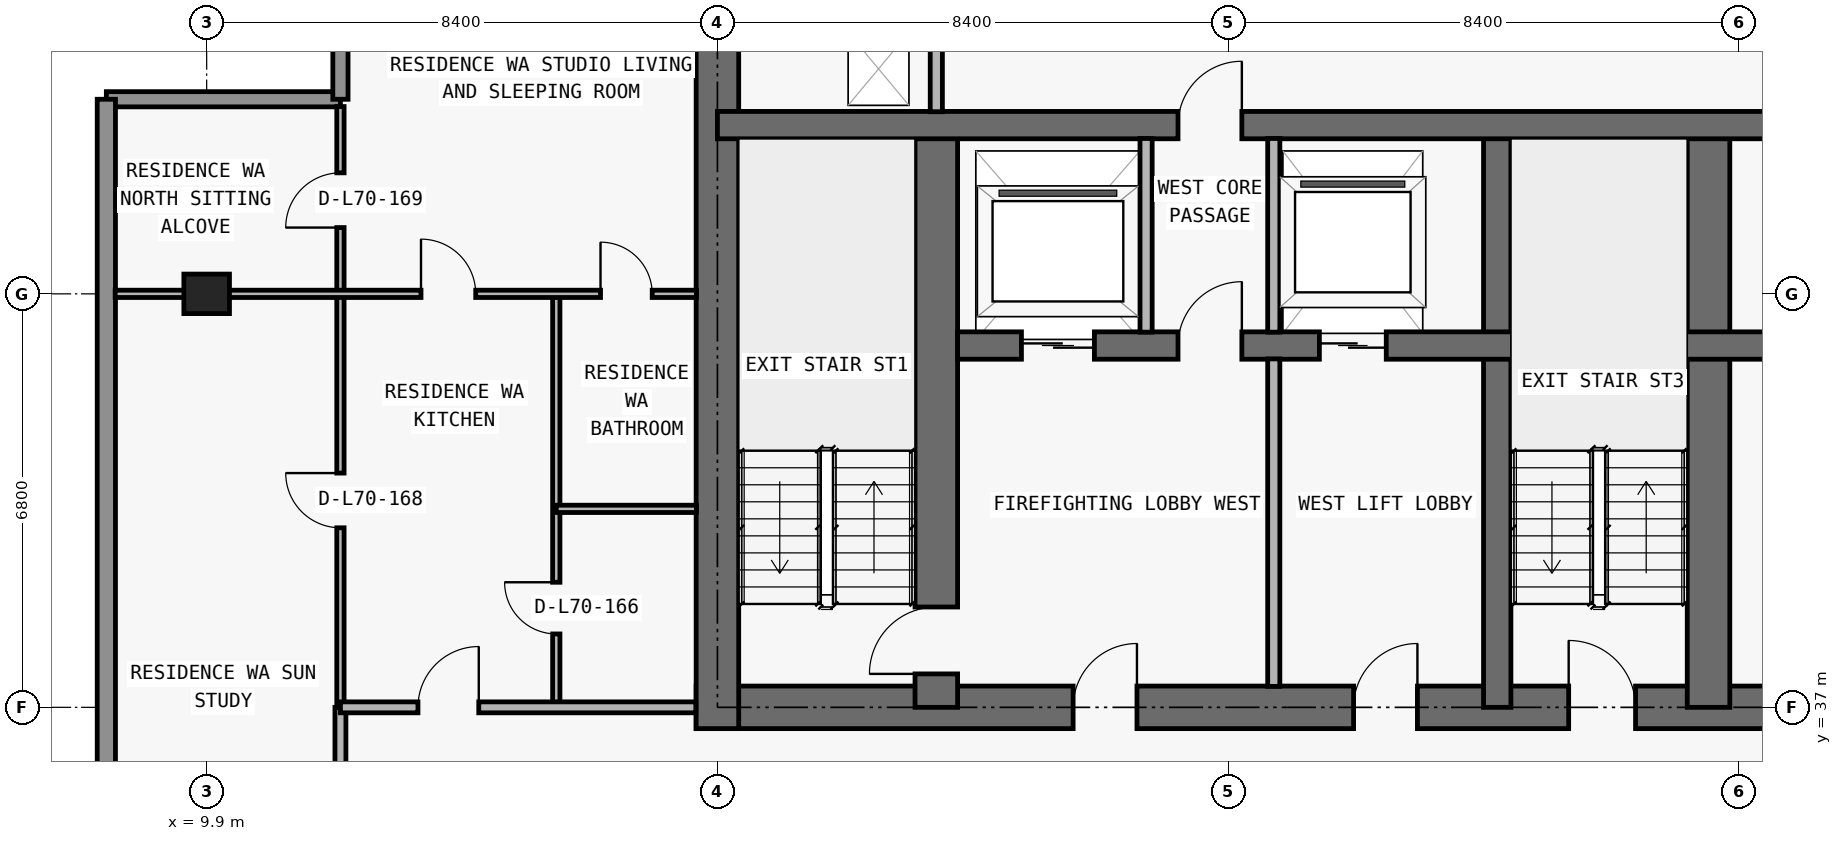
"""IFC4 building model, lengths in metres.
Left out: names, types, materials, properties, quantities, classifications, styles, units other than length and angle.
Written with IfcOpenShell. Run it as: python <this file> out.ifc"""

import sys

from ifc_helpers import new_model, si_unit, direction, frame, frame_2d, origin, origin_2d, place, context, subcontext, project, spatial, rectangle, extrude, element, fill, save


model = new_model("IFC4")
c1 = context("Model", 3, precision=1e-05, world=origin(), true_north=direction((0.0, 1.0)))
c2 = subcontext(c1, "Body", "Model", "MODEL_VIEW")
j1 = project(units=[si_unit("LENGTHUNIT", "METRE"), si_unit("PLANEANGLEUNIT", "RADIAN")], contexts=[c1])
p1 = place(None, origin())
s1 = spatial("IfcSite", under=j1, at=p1, CompositionType="ELEMENT")
p2 = place(p1, origin())
s2 = spatial("IfcBuilding", under=s1, at=p2, CompositionType="ELEMENT")
p3 = place(p2, frame((0.0, 0.0, 249.6)))
s3 = spatial("IfcBuildingStorey", under=s2, at=p3, CompositionType="ELEMENT", Elevation=249.6)
p4 = place(p3, frame((9.9, 43.8, 0.0), z_axis=(0.0, 0.0, 1.0), x_axis=(1.0, 0.0, 0.0)))
e1 = element("IfcColumn", 1, at=p4, inside=s3, PredefinedType="COLUMN", context=c2, shape_type="SweptSolid", body=[
    extrude(rectangle(XDim=0.75, YDim=0.65, at=origin_2d()), origin(), (0.0, 0.0, 1.0), 3.05),
])
p5 = place(p3, frame((17.95, 37.0, 0.0), z_axis=(0.0, 0.0, 1.0), x_axis=(1.0, 0.0, 0.0)))
e2 = element("IfcWall", 2, at=p5, inside=s3, PredefinedType="SHEAR", context=c2, shape_type="SweptSolid", body=[
    extrude(rectangle(XDim=41.9, YDim=0.7, at=frame_2d((20.95, 0.0))), origin(), (0.0, 0.0, 1.0), 3.05),
])
p6 = place(p5, frame((14.35, 0.0, 0.0)))
e3 = element("IfcOpeningElement", 3, at=p6, cuts=e2, PredefinedType="OPENING", context=c2, shape_type="SweptSolid", body=[
    extrude(rectangle(XDim=1.1, YDim=2.15, at=frame_2d((0.55, 1.075))), frame((0.0, 0.36, 0.0), z_axis=(0.0, -1.0, 0.0), x_axis=(1.0, 0.0, 0.0)), (0.0, 0.0, 1.0), 0.72),
])
p7 = place(p5, frame((6.2, 0.0, 0.0)))
e4 = element("IfcOpeningElement", 4, at=p7, cuts=e2, PredefinedType="OPENING", context=c2, shape_type="SweptSolid", body=[
    extrude(rectangle(XDim=1.05, YDim=2.15, at=frame_2d((0.525, 1.075))), frame((0.0, 0.36, 0.0), z_axis=(0.0, -1.0, 0.0), x_axis=(1.0, 0.0, 0.0)), (0.0, 0.0, 1.0), 0.72),
])
p8 = place(p5, frame((34.7, 0.0, 0.0)))
e5 = element("IfcOpeningElement", 5, at=p8, cuts=e2, PredefinedType="OPENING", context=c2, shape_type="SweptSolid", body=[
    extrude(rectangle(XDim=1.05, YDim=2.15, at=frame_2d((0.525, 1.075))), frame((0.0, 0.36, 0.0), z_axis=(0.0, -1.0, 0.0), x_axis=(1.0, 0.0, 0.0)), (0.0, 0.0, 1.0), 0.72),
])
p9 = place(p5, frame((10.812, 0.0, 0.0)))
e6 = element("IfcOpeningElement", 6, at=p9, cuts=e2, PredefinedType="OPENING", context=c2, shape_type="SweptSolid", body=[
    extrude(rectangle(XDim=1.05, YDim=2.15, at=frame_2d((0.525, 1.075))), frame((0.0, 0.36, 0.0), z_axis=(0.0, -1.0, 0.0), x_axis=(1.0, 0.0, 0.0)), (0.0, 0.0, 1.0), 0.72),
])
p10 = place(p5, frame((24.05, 0.0, 0.0)))
e7 = element("IfcOpeningElement", 7, at=p10, cuts=e2, PredefinedType="OPENING", context=c2, shape_type="SweptSolid", body=[
    extrude(rectangle(XDim=1.05, YDim=2.15, at=frame_2d((0.525, 1.075))), frame((0.0, 0.36, 0.0), z_axis=(0.0, -1.0, 0.0), x_axis=(1.0, 0.0, 0.0)), (0.0, 0.0, 1.0), 0.72),
])
p11 = place(p3, frame((18.3, 36.65, 0.0), z_axis=(0.0, 0.0, 1.0), x_axis=(0.0, 1.0, 0.0)))
e8 = element("IfcWall", 8, at=p11, inside=s3, PredefinedType="SHEAR", context=c2, shape_type="SweptSolid", body=[
    extrude(rectangle(XDim=13.95, YDim=0.7, at=frame_2d((6.975, 0.0))), origin(), (0.0, 0.0, 1.0), 3.05),
])
p12 = place(p3, frame((21.9, 37.0, 0.0), z_axis=(0.0, 0.0, 1.0), x_axis=(0.0, 1.0, 0.0)))
e9 = element("IfcWall", 9, at=p12, inside=s3, PredefinedType="SHEAR", context=c2, shape_type="SweptSolid", body=[
    extrude(rectangle(XDim=9.575, YDim=0.7, at=frame_2d((4.788, 0.0))), origin(), (0.0, 0.0, 1.0), 3.05),
])
p13 = place(p12, frame((0.55, 0.0, 0.0)))
e10 = element("IfcOpeningElement", 10, at=p13, cuts=e9, PredefinedType="OPENING", context=c2, shape_type="SweptSolid", body=[
    extrude(rectangle(XDim=1.1, YDim=2.15, at=frame_2d((0.55, 1.075))), frame((0.0, 0.36, 0.0), z_axis=(0.0, -1.0, 0.0), x_axis=(1.0, 0.0, 0.0)), (0.0, 0.0, 1.0), 0.72),
])
p14 = place(p3, frame((31.125, 37.0, 0.0), z_axis=(0.0, 0.0, 1.0), x_axis=(0.0, 1.0, 0.0)))
e11 = element("IfcWall", 11, at=p14, inside=s3, PredefinedType="SHEAR", context=c2, shape_type="SweptSolid", body=[
    extrude(rectangle(XDim=9.575, YDim=0.45, at=frame_2d((4.788, 0.0))), origin(), (0.0, 0.0, 1.0), 3.05),
])
p15 = place(p3, frame((34.6, 37.0, 0.0), z_axis=(0.0, 0.0, 1.0), x_axis=(0.0, 1.0, 0.0)))
e12 = element("IfcWall", 12, at=p15, inside=s3, PredefinedType="SHEAR", context=c2, shape_type="SweptSolid", body=[
    extrude(rectangle(XDim=9.575, YDim=0.7, at=frame_2d((4.788, 0.0))), origin(), (0.0, 0.0, 1.0), 3.05),
])
p16 = place(p3, frame((22.25, 42.95, 0.0), z_axis=(0.0, 0.0, 1.0), x_axis=(1.0, 0.0, 0.0)))
e13 = element("IfcWall", 13, at=p16, inside=s3, PredefinedType="SHEAR", context=c2, shape_type="SweptSolid", body=[
    extrude(rectangle(XDim=33.3, YDim=0.45, at=frame_2d((16.65, 0.0))), origin(), (0.0, 0.0, 1.0), 3.05),
])
p17 = place(p16, frame((1.05, 0.0, 0.0)))
e14 = element("IfcOpeningElement", 14, at=p17, cuts=e13, PredefinedType="OPENING", context=c2, shape_type="SweptSolid", body=[
    extrude(rectangle(XDim=1.2, YDim=2.2, at=frame_2d((0.6, 1.1))), frame((0.0, 0.235, 0.0), z_axis=(0.0, -1.0, 0.0), x_axis=(1.0, 0.0, 0.0)), (0.0, 0.0, 1.0), 0.47),
])
p18 = place(p16, frame((31.05, 0.0, 0.0)))
e15 = element("IfcOpeningElement", 15, at=p18, cuts=e13, PredefinedType="OPENING", context=c2, shape_type="SweptSolid", body=[
    extrude(rectangle(XDim=1.2, YDim=2.2, at=frame_2d((0.6, 1.1))), frame((0.0, 0.235, 0.0), z_axis=(0.0, -1.0, 0.0), x_axis=(1.0, 0.0, 0.0)), (0.0, 0.0, 1.0), 0.47),
])
p19 = place(p16, frame((26.45, 0.0, 0.0)))
e16 = element("IfcOpeningElement", 16, at=p19, cuts=e13, PredefinedType="OPENING", context=c2, shape_type="SweptSolid", body=[
    extrude(rectangle(XDim=1.1, YDim=2.2, at=frame_2d((0.55, 1.1))), frame((0.0, 0.235, 0.0), z_axis=(0.0, -1.0, 0.0), x_axis=(1.0, 0.0, 0.0)), (0.0, 0.0, 1.0), 0.47),
])
p20 = place(p16, frame((5.95, 0.0, 0.0)))
e17 = element("IfcOpeningElement", 17, at=p20, cuts=e13, PredefinedType="OPENING", context=c2, shape_type="SweptSolid", body=[
    extrude(rectangle(XDim=1.1, YDim=2.2, at=frame_2d((0.55, 1.1))), frame((0.0, 0.235, 0.0), z_axis=(0.0, -1.0, 0.0), x_axis=(1.0, 0.0, 0.0)), (0.0, 0.0, 1.0), 0.47),
])
p21 = place(p16, frame((3.625, 0.0, 0.0)))
e18 = element("IfcOpeningElement", 18, at=p21, cuts=e13, PredefinedType="OPENING", context=c2, shape_type="SweptSolid", body=[
    extrude(rectangle(XDim=1.05, YDim=2.15, at=frame_2d((0.525, 1.075))), frame((0.0, 0.235, 0.0), z_axis=(0.0, -1.0, 0.0), x_axis=(1.0, 0.0, 0.0)), (0.0, 0.0, 1.0), 0.47),
])
p22 = place(p16, frame((28.675, 0.0, 0.0)))
e19 = element("IfcOpeningElement", 19, at=p22, cuts=e13, PredefinedType="OPENING", context=c2, shape_type="SweptSolid", body=[
    extrude(rectangle(XDim=1.05, YDim=2.15, at=frame_2d((0.525, 1.075))), frame((0.0, 0.235, 0.0), z_axis=(0.0, -1.0, 0.0), x_axis=(1.0, 0.0, 0.0)), (0.0, 0.0, 1.0), 0.47),
])
p23 = place(p16, frame((15.225, 0.0, 0.0)))
e20 = element("IfcOpeningElement", 20, at=p23, cuts=e13, PredefinedType="OPENING", context=c2, shape_type="SweptSolid", body=[
    extrude(rectangle(XDim=1.0, YDim=2.2, at=frame_2d((0.5, 1.1))), frame((0.0, 0.235, 0.0), z_axis=(0.0, -1.0, 0.0), x_axis=(1.0, 0.0, 0.0)), (0.0, 0.0, 1.0), 0.47),
])
p24 = place(p16, frame((21.975, 0.0, 0.0)))
e21 = element("IfcOpeningElement", 21, at=p24, cuts=e13, PredefinedType="OPENING", context=c2, shape_type="SweptSolid", body=[
    extrude(rectangle(XDim=1.0, YDim=2.2, at=frame_2d((0.5, 1.1))), frame((0.0, 0.235, 0.0), z_axis=(0.0, -1.0, 0.0), x_axis=(1.0, 0.0, 0.0)), (0.0, 0.0, 1.0), 0.47),
])
p25 = place(p3, frame((18.3, 46.575, 0.0), z_axis=(0.0, 0.0, 1.0), x_axis=(1.0, 0.0, 0.0)))
e22 = element("IfcWall", 22, at=p25, inside=s3, PredefinedType="SHEAR", context=c2, shape_type="SweptSolid", body=[
    extrude(rectangle(XDim=41.2, YDim=0.45, at=frame_2d((20.6, 0.0))), origin(), (0.0, 0.0, 1.0), 3.05),
])
p26 = place(p25, frame((7.575, 0.0, 0.0)))
e23 = element("IfcOpeningElement", 23, at=p26, cuts=e22, PredefinedType="OPENING", context=c2, shape_type="SweptSolid", body=[
    extrude(rectangle(XDim=1.05, YDim=2.15, at=frame_2d((0.525, 1.075))), frame((0.0, 0.235, 0.0), z_axis=(0.0, -1.0, 0.0), x_axis=(1.0, 0.0, 0.0)), (0.0, 0.0, 1.0), 0.47),
])
p27 = place(p25, frame((32.625, 0.0, 0.0)))
e24 = element("IfcOpeningElement", 24, at=p27, cuts=e22, PredefinedType="OPENING", context=c2, shape_type="SweptSolid", body=[
    extrude(rectangle(XDim=1.05, YDim=2.15, at=frame_2d((0.525, 1.075))), frame((0.0, 0.235, 0.0), z_axis=(0.0, -1.0, 0.0), x_axis=(1.0, 0.0, 0.0)), (0.0, 0.0, 1.0), 0.47),
])
p28 = place(p3, frame((8.25, 47.0, 0.0), z_axis=(0.0, 0.0, 1.0), x_axis=(1.0, 0.0, 0.0)))
e25 = element("IfcWall", 25, at=p28, inside=s3, PredefinedType="ELEMENTEDWALL", context=c2, shape_type="SweptSolid", body=[
    extrude(rectangle(XDim=3.85, YDim=0.25, at=frame_2d((1.925, 0.0))), origin(), (0.0, 0.0, 1.0), 3.05),
])
p29 = place(p3, frame((12.1, 47.0, 0.0), z_axis=(0.0, 0.0, 1.0), x_axis=(0.0, 1.0, 0.0)))
e26 = element("IfcWall", 26, at=p29, inside=s3, PredefinedType="ELEMENTEDWALL", context=c2, shape_type="SweptSolid", body=[
    extrude(rectangle(XDim=3.45, YDim=0.25, at=frame_2d((1.725, 0.0))), origin(), (0.0, 0.0, 1.0), 3.05),
])
p30 = place(p3, frame((8.25, 30.15, 0.0), z_axis=(0.0, 0.0, 1.0), x_axis=(0.0, 1.0, 0.0)))
e27 = element("IfcWall", 27, at=p30, inside=s3, PredefinedType="STANDARD", context=c2, shape_type="SweptSolid", body=[
    extrude(rectangle(XDim=16.85, YDim=0.3, at=frame_2d((8.425, 0.0))), origin(), (0.0, 0.0, 1.0), 3.05),
])
p31 = place(p3, frame((12.1, 34.705, 0.0), z_axis=(0.0, 0.0, 1.0), x_axis=(0.0, 1.0, 0.0)))
e28 = element("IfcWall", 28, at=p31, inside=s3, PredefinedType="PARTITIONING", context=c2, shape_type="SweptSolid", body=[
    extrude(rectangle(XDim=2.295, YDim=0.18, at=frame_2d((1.147, 0.0))), origin(), (0.0, 0.0, 1.0), 2.578),
])
p32 = place(p3, frame((12.1, 37.005, 0.0), z_axis=(0.0, 0.0, 1.0), x_axis=(0.0, 1.0, 0.0)))
e29 = element("IfcWall", 29, at=p32, inside=s3, PredefinedType="PARTITIONING", context=c2, shape_type="SweptSolid", body=[
    extrude(rectangle(XDim=9.875, YDim=0.12, at=frame_2d((4.938, 0.0))), origin(), (0.0, 0.0, 1.0), 2.578),
])
p33 = place(p32, frame((2.948, 0.0, 0.0)))
e30 = element("IfcOpeningElement", 30, at=p33, cuts=e29, PredefinedType="OPENING", context=c2, shape_type="SweptSolid", body=[
    extrude(rectangle(XDim=0.9, YDim=2.15, at=frame_2d((0.45, 1.075))), frame((0.0, 0.07, 0.0), z_axis=(0.0, -1.0, 0.0), x_axis=(1.0, 0.0, 0.0)), (0.0, 0.0, 1.0), 0.14),
])
p34 = place(p32, frame((7.885, 0.0, 0.0)))
e31 = element("IfcOpeningElement", 31, at=p34, cuts=e29, PredefinedType="OPENING", context=c2, shape_type="SweptSolid", body=[
    extrude(rectangle(XDim=0.9, YDim=2.15, at=frame_2d((0.45, 1.075))), frame((0.0, 0.07, 0.0), z_axis=(0.0, -1.0, 0.0), x_axis=(1.0, 0.0, 0.0)), (0.0, 0.0, 1.0), 0.14),
])
p35 = place(p3, frame((15.65, 37.0, 0.0), z_axis=(0.0, 0.0, 1.0), x_axis=(0.0, 1.0, 0.0)))
e32 = element("IfcWall", 32, at=p35, inside=s3, PredefinedType="PARTITIONING", context=c2, shape_type="SweptSolid", body=[
    extrude(rectangle(XDim=6.8, YDim=0.12, at=frame_2d((3.4, 0.0))), origin(), (0.0, 0.0, 1.0), 3.05),
])
p36 = place(p35, frame((1.207, 0.0, 0.0)))
e33 = element("IfcOpeningElement", 33, at=p36, cuts=e32, PredefinedType="OPENING", context=c2, shape_type="SweptSolid", body=[
    extrude(rectangle(XDim=0.85, YDim=2.1, at=frame_2d((0.425, 1.05))), frame((0.0, 0.07, 0.0), z_axis=(0.0, -1.0, 0.0), x_axis=(1.0, 0.0, 0.0)), (0.0, 0.0, 1.0), 0.14),
])
p37 = place(p3, frame((21.9, 46.795, 0.0), z_axis=(0.0, 0.0, 1.0), x_axis=(0.0, 1.0, 0.0)))
e34 = element("IfcWall", 34, at=p37, inside=s3, PredefinedType="PARTITIONING", context=c2, shape_type="SweptSolid", body=[
    extrude(rectangle(XDim=3.16, YDim=0.2, at=frame_2d((1.58, 0.0))), origin(), (0.0, 0.0, 1.0), 3.05),
])
p38 = place(p3, frame((25.35, 43.17, 0.0), z_axis=(0.0, 0.0, 1.0), x_axis=(0.0, 1.0, 0.0)))
e35 = element("IfcWall", 35, at=p38, inside=s3, PredefinedType="PARTITIONING", context=c2, shape_type="SweptSolid", body=[
    extrude(rectangle(XDim=3.185, YDim=0.2, at=frame_2d((1.593, 0.0))), origin(), (0.0, 0.0, 1.0), 3.05),
])
p39 = place(p3, frame((27.45, 37.345, 0.0), z_axis=(0.0, 0.0, 1.0), x_axis=(0.0, 1.0, 0.0)))
e36 = element("IfcWall", 36, at=p39, inside=s3, PredefinedType="PARTITIONING", context=c2, shape_type="SweptSolid", body=[
    extrude(rectangle(XDim=5.385, YDim=0.2, at=frame_2d((2.692, 0.0))), origin(), (0.0, 0.0, 1.0), 3.05),
])
p40 = place(p3, frame((27.45, 43.17, 0.0), z_axis=(0.0, 0.0, 1.0), x_axis=(0.0, 1.0, 0.0)))
e37 = element("IfcWall", 37, at=p40, inside=s3, PredefinedType="PARTITIONING", context=c2, shape_type="SweptSolid", body=[
    extrude(rectangle(XDim=3.185, YDim=0.2, at=frame_2d((1.593, 0.0))), origin(), (0.0, 0.0, 1.0), 3.05),
])
p41 = place(p3, frame((12.1, 37.0, 0.0), z_axis=(0.0, 0.0, 1.0), x_axis=(1.0, 0.0, 0.0)))
e38 = element("IfcWall", 38, at=p41, inside=s3, PredefinedType="PARTITIONING", context=c2, shape_type="SweptSolid", body=[
    extrude(rectangle(XDim=5.845, YDim=0.18, at=frame_2d((2.922, 0.0))), origin(), (0.0, 0.0, 1.0), 3.05),
])
p42 = place(p41, frame((1.275, 0.0, 0.0)))
e39 = element("IfcOpeningElement", 39, at=p42, cuts=e38, PredefinedType="OPENING", context=c2, shape_type="SweptSolid", body=[
    extrude(rectangle(XDim=1.0, YDim=2.2, at=frame_2d((0.5, 1.1))), frame((0.0, 0.1, 0.0), z_axis=(0.0, -1.0, 0.0), x_axis=(1.0, 0.0, 0.0)), (0.0, 0.0, 1.0), 0.2),
])
p43 = place(p3, frame((15.65, 40.264, 0.0), z_axis=(0.0, 0.0, 1.0), x_axis=(1.0, 0.0, 0.0)))
e40 = element("IfcWall", 40, at=p43, inside=s3, PredefinedType="PARTITIONING", context=c2, shape_type="SweptSolid", body=[
    extrude(rectangle(XDim=2.305, YDim=0.12, at=frame_2d((1.153, 0.0))), origin(), (0.0, 0.0, 1.0), 3.05),
])
p44 = place(p3, frame((8.395, 43.8, 0.0), z_axis=(0.0, 0.0, 1.0), x_axis=(1.0, 0.0, 0.0)))
e41 = element("IfcWall", 41, at=p44, inside=s3, PredefinedType="PARTITIONING", context=c2, shape_type="SweptSolid", body=[
    extrude(rectangle(XDim=9.56, YDim=0.12, at=frame_2d((4.78, 0.0))), origin(), (0.0, 0.0, 1.0), 2.418),
])
p45 = place(p44, frame((5.03, 0.0, 0.0)))
e42 = element("IfcOpeningElement", 42, at=p45, cuts=e41, PredefinedType="OPENING", context=c2, shape_type="SweptSolid", body=[
    extrude(rectangle(XDim=0.9, YDim=2.15, at=frame_2d((0.45, 1.075))), frame((0.0, 0.07, 0.0), z_axis=(0.0, -1.0, 0.0), x_axis=(1.0, 0.0, 0.0)), (0.0, 0.0, 1.0), 0.14),
])
p46 = place(p44, frame((7.982, 0.0, 0.0)))
e43 = element("IfcOpeningElement", 43, at=p46, cuts=e41, PredefinedType="OPENING", context=c2, shape_type="SweptSolid", body=[
    extrude(rectangle(XDim=0.85, YDim=2.1, at=frame_2d((0.425, 1.05))), frame((0.0, 0.07, 0.0), z_axis=(0.0, -1.0, 0.0), x_axis=(1.0, 0.0, 0.0)), (0.0, 0.0, 1.0), 0.14),
])
p47 = place(p17, origin())
e44 = element("IfcDoor", 44, at=p47, inside=s3, OperationType="DOUBLE_DOOR_SLIDING", PredefinedType="DOOR", context=c2, shape_type="SweptSolid", body=[
    extrude(rectangle(XDim=1.2, YDim=2.2, at=frame_2d((0.6, 1.1))), frame((0.0, 0.025, 0.0), z_axis=(0.0, -1.0, 0.0), x_axis=(1.0, 0.0, 0.0)), (0.0, 0.0, 1.0), 0.05),
])
fill(e14, e44)
p48 = place(p20, origin())
e45 = element("IfcDoor", 45, at=p48, inside=s3, OperationType="DOUBLE_DOOR_SLIDING", PredefinedType="DOOR", context=c2, shape_type="SweptSolid", body=[
    extrude(rectangle(XDim=1.1, YDim=2.2, at=frame_2d((0.55, 1.1))), frame((0.0, 0.025, 0.0), z_axis=(0.0, -1.0, 0.0), x_axis=(1.0, 0.0, 0.0)), (0.0, 0.0, 1.0), 0.05),
])
fill(e17, e45)
p49 = place(p6, origin())
e46 = element("IfcDoor", 46, at=p49, inside=s3, OperationType="SINGLE_SWING_LEFT", PredefinedType="DOOR", context=c2, shape_type="SweptSolid", body=[
    extrude(rectangle(XDim=1.1, YDim=2.15, at=frame_2d((0.55, 1.075))), frame((0.0, 0.025, 0.0), z_axis=(0.0, -1.0, 0.0), x_axis=(1.0, 0.0, 0.0)), (0.0, 0.0, 1.0), 0.05),
])
fill(e3, e46)
p50 = place(p7, origin())
e47 = element("IfcDoor", 47, at=p50, inside=s3, OperationType="SINGLE_SWING_RIGHT", PredefinedType="DOOR", context=c2, shape_type="SweptSolid", body=[
    extrude(rectangle(XDim=1.05, YDim=2.15, at=frame_2d((0.525, 1.075))), frame((0.0, 0.025, 0.0), z_axis=(0.0, -1.0, 0.0), x_axis=(1.0, 0.0, 0.0)), (0.0, 0.0, 1.0), 0.05),
])
fill(e4, e47)
p51 = place(p13, origin())
e48 = element("IfcDoor", 48, at=p51, inside=s3, OperationType="SINGLE_SWING_LEFT", PredefinedType="DOOR", context=c2, shape_type="SweptSolid", body=[
    extrude(rectangle(XDim=1.1, YDim=2.15, at=frame_2d((0.55, 1.075))), frame((0.0, 0.025, 0.0), z_axis=(0.0, -1.0, 0.0), x_axis=(1.0, 0.0, 0.0)), (0.0, 0.0, 1.0), 0.05),
])
fill(e10, e48)
p52 = place(p21, origin())
e49 = element("IfcDoor", 49, at=p52, inside=s3, OperationType="SINGLE_SWING_RIGHT", PredefinedType="DOOR", context=c2, shape_type="SweptSolid", body=[
    extrude(rectangle(XDim=1.05, YDim=2.15, at=frame_2d((0.525, 1.075))), frame((0.0, 0.025, 0.0), z_axis=(0.0, -1.0, 0.0), x_axis=(1.0, 0.0, 0.0)), (0.0, 0.0, 1.0), 0.05),
])
fill(e18, e49)
p53 = place(p9, origin())
e50 = element("IfcDoor", 50, at=p53, inside=s3, OperationType="SINGLE_SWING_RIGHT", PredefinedType="DOOR", context=c2, shape_type="SweptSolid", body=[
    extrude(rectangle(XDim=1.05, YDim=2.15, at=frame_2d((0.525, 1.075))), frame((0.0, 0.025, 0.0), z_axis=(0.0, -1.0, 0.0), x_axis=(1.0, 0.0, 0.0)), (0.0, 0.0, 1.0), 0.05),
])
fill(e6, e50)
p54 = place(p26, origin())
e51 = element("IfcDoor", 51, at=p54, inside=s3, OperationType="SINGLE_SWING_RIGHT", PredefinedType="DOOR", context=c2, shape_type="SweptSolid", body=[
    extrude(rectangle(XDim=1.05, YDim=2.15, at=frame_2d((0.525, 1.075))), frame((0.0, 0.025, 0.0), z_axis=(0.0, -1.0, 0.0), x_axis=(1.0, 0.0, 0.0)), (0.0, 0.0, 1.0), 0.05),
])
fill(e23, e51)
p55 = place(p42, origin())
e52 = element("IfcDoor", 52, at=p55, inside=s3, OperationType="SINGLE_SWING_RIGHT", PredefinedType="DOOR", context=c2, shape_type="SweptSolid", body=[
    extrude(rectangle(XDim=1.0, YDim=2.2, at=frame_2d((0.5, 1.1))), frame((0.0, 0.025, 0.0), z_axis=(0.0, -1.0, 0.0), x_axis=(1.0, 0.0, 0.0)), (0.0, 0.0, 1.0), 0.05),
])
fill(e39, e52)
p56 = place(p45, origin())
e53 = element("IfcDoor", 53, at=p56, inside=s3, OperationType="SINGLE_SWING_LEFT", PredefinedType="DOOR", context=c2, shape_type="SweptSolid", body=[
    extrude(rectangle(XDim=0.9, YDim=2.15, at=frame_2d((0.45, 1.075))), frame((0.0, 0.025, 0.0), z_axis=(0.0, -1.0, 0.0), x_axis=(1.0, 0.0, 0.0)), (0.0, 0.0, 1.0), 0.05),
])
fill(e42, e53)
p57 = place(p36, origin())
e54 = element("IfcDoor", 54, at=p57, inside=s3, OperationType="SINGLE_SWING_RIGHT", PredefinedType="DOOR", context=c2, shape_type="SweptSolid", body=[
    extrude(rectangle(XDim=0.85, YDim=2.1, at=frame_2d((0.425, 1.05))), frame((0.0, 0.025, 0.0), z_axis=(0.0, -1.0, 0.0), x_axis=(1.0, 0.0, 0.0)), (0.0, 0.0, 1.0), 0.05),
])
fill(e33, e54)
p58 = place(p46, origin())
e55 = element("IfcDoor", 55, at=p58, inside=s3, OperationType="SINGLE_SWING_LEFT", PredefinedType="DOOR", context=c2, shape_type="SweptSolid", body=[
    extrude(rectangle(XDim=0.85, YDim=2.1, at=frame_2d((0.425, 1.05))), frame((0.0, 0.025, 0.0), z_axis=(0.0, -1.0, 0.0), x_axis=(1.0, 0.0, 0.0)), (0.0, 0.0, 1.0), 0.05),
])
fill(e43, e55)
p59 = place(p33, origin())
e56 = element("IfcDoor", 56, at=p59, inside=s3, OperationType="SINGLE_SWING_RIGHT", PredefinedType="DOOR", context=c2, shape_type="SweptSolid", body=[
    extrude(rectangle(XDim=0.9, YDim=2.15, at=frame_2d((0.45, 1.075))), frame((0.0, 0.025, 0.0), z_axis=(0.0, -1.0, 0.0), x_axis=(1.0, 0.0, 0.0)), (0.0, 0.0, 1.0), 0.05),
])
fill(e30, e56)
p60 = place(p34, origin())
e57 = element("IfcDoor", 57, at=p60, inside=s3, OperationType="SINGLE_SWING_LEFT", PredefinedType="DOOR", context=c2, shape_type="SweptSolid", body=[
    extrude(rectangle(XDim=0.9, YDim=2.15, at=frame_2d((0.45, 1.075))), frame((0.0, 0.025, 0.0), z_axis=(0.0, -1.0, 0.0), x_axis=(1.0, 0.0, 0.0)), (0.0, 0.0, 1.0), 0.05),
])
fill(e31, e57)
save(model, sys.argv[1])
